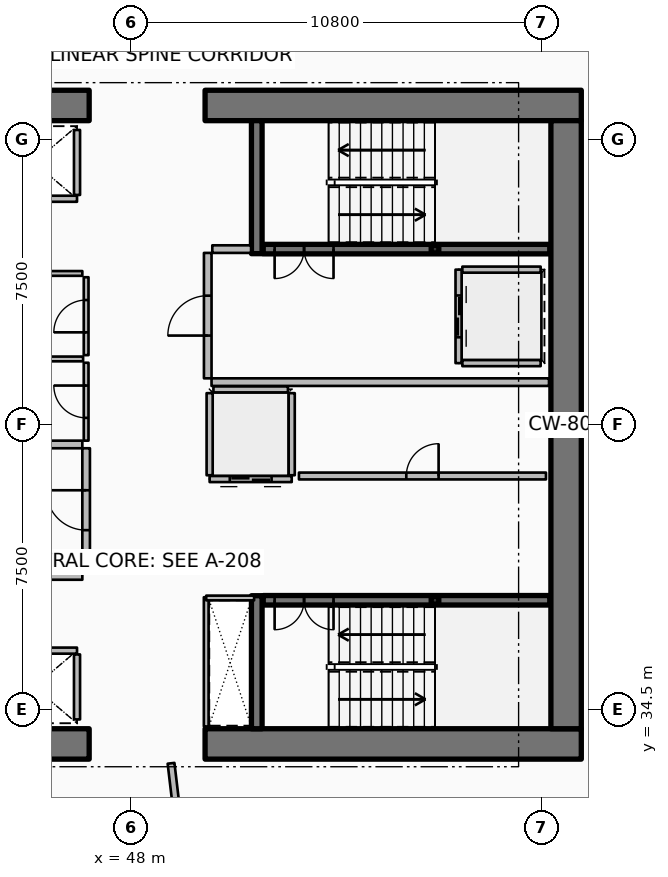
"""IFC4 building model, lengths in metres.
Left out: names, types, materials, properties, quantities, classifications, styles, units other than length and angle.
Written with IfcOpenShell. Run it as: python <this file> out.ifc"""

import sys

from ifc_helpers import new_model, si_unit, direction, frame, frame_2d, origin, origin_2d, place, context, subcontext, project, spatial, rectangle, hollow_rectangle, extrude, element, fill, save


model = new_model("IFC4")
c1 = context("Model", 3, precision=1e-05, world=origin(), true_north=direction((0.0, 1.0)))
c2 = subcontext(c1, "Body", "Model", "MODEL_VIEW")
j1 = project(units=[si_unit("LENGTHUNIT", "METRE"), si_unit("PLANEANGLEUNIT", "RADIAN")], contexts=[c1])
p1 = place(None, origin())
s1 = spatial("IfcSite", under=j1, at=p1, CompositionType="ELEMENT")
p2 = place(p1, origin())
s2 = spatial("IfcBuilding", under=s1, at=p2, CompositionType="ELEMENT")
p3 = place(p2, frame((0.0, 0.0, 142.8)))
s3 = spatial("IfcBuildingStorey", under=s2, at=p3, CompositionType="ELEMENT", Elevation=142.8)
p4 = place(p3, frame((37.0, 33.6, 0.0), z_axis=(0.0, 0.0, 1.0), x_axis=(1.0, 0.0, 0.0)))
e1 = element("IfcWall", 1, at=p4, inside=s3, PredefinedType="SHEAR", context=c2, shape_type="SweptSolid", body=[
    extrude(rectangle(XDim=9.9, YDim=0.8, at=frame_2d((4.95, 0.0))), origin(), (0.0, 0.0, 1.0), 3.75),
])
p5 = place(p3, frame((49.95, 33.6, 0.0), z_axis=(0.0, 0.0, 1.0), x_axis=(1.0, 0.0, 0.0)))
e2 = element("IfcWall", 2, at=p5, inside=s3, PredefinedType="SHEAR", context=c2, shape_type="SweptSolid", body=[
    extrude(rectangle(XDim=9.9, YDim=0.8, at=frame_2d((4.95, 0.0))), origin(), (0.0, 0.0, 1.0), 3.75),
])
p6 = place(p3, frame((37.0, 50.4, 0.0), z_axis=(0.0, 0.0, 1.0), x_axis=(1.0, 0.0, 0.0)))
e3 = element("IfcWall", 3, at=p6, inside=s3, PredefinedType="SHEAR", context=c2, shape_type="SweptSolid", body=[
    extrude(rectangle(XDim=9.9, YDim=0.8, at=frame_2d((4.95, 0.0))), origin(), (0.0, 0.0, 1.0), 3.75),
])
p7 = place(p3, frame((49.95, 50.4, 0.0), z_axis=(0.0, 0.0, 1.0), x_axis=(1.0, 0.0, 0.0)))
e4 = element("IfcWall", 4, at=p7, inside=s3, PredefinedType="SHEAR", context=c2, shape_type="SweptSolid", body=[
    extrude(rectangle(XDim=9.9, YDim=0.8, at=frame_2d((4.95, 0.0))), origin(), (0.0, 0.0, 1.0), 3.75),
])
p8 = place(p3, frame((59.45, 34.0, 0.0), z_axis=(0.0, 0.0, 1.0), x_axis=(0.0, 1.0, 0.0)))
e5 = element("IfcWall", 5, at=p8, inside=s3, PredefinedType="SHEAR", context=c2, shape_type="SweptSolid", body=[
    extrude(rectangle(XDim=16.0, YDim=0.8, at=frame_2d((8.0, 0.0))), origin(), (0.0, 0.0, 1.0), 3.75),
])
for number, where, z_axis, x_axis in (
    (6, (51.31, 46.5, 0.0), (0.0, 0.0, 1.0), (0.0, 1.0, 0.0)),
    (7, (51.31, 34.0, 0.0), (0.0, 0.0, 1.0), (0.0, 1.0, 0.0)),
):
    element("IfcWall", number, at=place(p3, frame(where, z_axis=z_axis, x_axis=x_axis)), inside=s3, PredefinedType="SHEAR", context=c2, shape_type="SweptSolid", body=[
        extrude(rectangle(XDim=3.5, YDim=0.28, at=frame_2d((1.75, 0.0))), origin(), (0.0, 0.0, 1.0), 3.75),
    ])
for number, where, z_axis, x_axis in (
    (8, (56.0, 46.62, 0.0), (0.0, 0.0, 1.0), (1.0, 0.0, 0.0)),
    (9, (56.0, 37.38, 0.0), (0.0, 0.0, 1.0), (1.0, 0.0, 0.0)),
):
    element("IfcColumn", number, at=place(p3, frame(where, z_axis=z_axis, x_axis=x_axis)), inside=s3, PredefinedType="COLUMN", context=c2, shape_type="SweptSolid", body=[
        extrude(hollow_rectangle(XDim=0.2, YDim=0.2, WallThickness=0.01, InnerFilletRadius=0.01, OuterFilletRadius=0.02, at=origin_2d()), origin(), (0.0, 0.0, 1.0), 1.67),
    ])
p9 = place(p3, frame((51.48, 46.62, 0.0), z_axis=(0.0, 0.0, 1.0), x_axis=(1.0, 0.0, 0.0)))
e10 = element("IfcWall", 10, at=p9, inside=s3, PredefinedType="SOLIDWALL", context=c2, shape_type="SweptSolid", body=[
    extrude(rectangle(XDim=7.54, YDim=0.25, at=frame_2d((3.77, 0.0))), origin(), (0.0, 0.0, 1.0), 3.5),
])
p10 = place(p9, frame((0.3, 0.0, 0.0)))
e11 = element("IfcOpeningElement", 11, at=p10, cuts=e10, PredefinedType="OPENING", context=c2, shape_type="SweptSolid", body=[
    extrude(rectangle(XDim=1.55, YDim=2.15, at=frame_2d((0.775, 1.075))), frame((0.0, 0.135, 0.0), z_axis=(0.0, -1.0, 0.0), x_axis=(1.0, 0.0, 0.0)), (0.0, 0.0, 1.0), 0.27),
])
p11 = place(p3, frame((51.48, 37.38, 0.0), z_axis=(0.0, 0.0, 1.0), x_axis=(1.0, 0.0, 0.0)))
e12 = element("IfcWall", 12, at=p11, inside=s3, PredefinedType="SOLIDWALL", context=c2, shape_type="SweptSolid", body=[
    extrude(rectangle(XDim=7.54, YDim=0.25, at=frame_2d((3.77, 0.0))), origin(), (0.0, 0.0, 1.0), 3.5),
])
p12 = place(p11, frame((0.3, 0.0, 0.0)))
e13 = element("IfcOpeningElement", 13, at=p12, cuts=e12, PredefinedType="OPENING", context=c2, shape_type="SweptSolid", body=[
    extrude(rectangle(XDim=1.55, YDim=2.15, at=frame_2d((0.775, 1.075))), frame((0.0, 0.135, 0.0), z_axis=(0.0, -1.0, 0.0), x_axis=(1.0, 0.0, 0.0)), (0.0, 0.0, 1.0), 0.27),
])
p13 = place(p3, frame((46.58, 47.945, 0.0), z_axis=(0.0, 0.0, 1.0), x_axis=(-1.0, 0.0, 0.0)))
e14 = element("IfcWall", 14, at=p13, inside=s3, PredefinedType="PARTITIONING", context=c2, shape_type="SweptSolid", body=[
    extrude(rectangle(XDim=2.26, YDim=0.16, at=frame_2d((1.13, 0.0))), origin(), (0.0, 0.0, 1.0), 3.5),
])
p14 = place(p3, frame((46.58, 48.045, 0.0), z_axis=(0.0, 0.0, 1.0), x_axis=(0.0, 1.0, 0.0)))
e15 = element("IfcWall", 15, at=p14, inside=s3, PredefinedType="PARTITIONING", context=c2, shape_type="SweptSolid", body=[
    extrude(rectangle(XDim=1.71, YDim=0.16, at=frame_2d((0.855, 0.0))), origin(), (0.0, 0.0, 1.0), 3.5),
])
p15 = place(p3, frame((44.32, 36.055, 0.0), z_axis=(0.0, 0.0, 1.0), x_axis=(1.0, 0.0, 0.0)))
e16 = element("IfcWall", 16, at=p15, inside=s3, PredefinedType="PARTITIONING", context=c2, shape_type="SweptSolid", body=[
    extrude(rectangle(XDim=2.26, YDim=0.16, at=frame_2d((1.13, 0.0))), origin(), (0.0, 0.0, 1.0), 3.5),
])
p16 = place(p3, frame((46.58, 34.245, 0.0), z_axis=(0.0, 0.0, 1.0), x_axis=(0.0, 1.0, 0.0)))
e17 = element("IfcWall", 17, at=p16, inside=s3, PredefinedType="PARTITIONING", context=c2, shape_type="SweptSolid", body=[
    extrude(rectangle(XDim=1.71, YDim=0.16, at=frame_2d((0.855, 0.0))), origin(), (0.0, 0.0, 1.0), 3.5),
])
p17 = place(p3, frame((56.62, 46.08, 0.0), z_axis=(0.0, 0.0, 1.0), x_axis=(0.0, -1.0, 0.0)))
e18 = element("IfcWall", 18, at=p17, inside=s3, PredefinedType="PARTITIONING", context=c2, shape_type="SweptSolid", body=[
    extrude(rectangle(XDim=2.46, YDim=0.16, at=frame_2d((1.23, 0.0))), origin(), (0.0, 0.0, 1.0), 3.5),
])
p18 = place(p17, frame((0.68, 0.0, 0.0)))
e19 = element("IfcOpeningElement", 19, at=p18, cuts=e18, PredefinedType="OPENING", context=c2, shape_type="SweptSolid", body=[
    extrude(rectangle(XDim=1.1, YDim=2.1, at=frame_2d((0.55, 1.05))), frame((0.0, 0.09, 0.0), z_axis=(0.0, -1.0, 0.0), x_axis=(1.0, 0.0, 0.0)), (0.0, 0.0, 1.0), 0.18),
])
for number, where, z_axis, x_axis in (
    (20, (56.72, 46.08, 0.0), (0.0, 0.0, 1.0), (1.0, 0.0, 0.0)),
    (21, (56.72, 43.62, 0.0), (0.0, 0.0, 1.0), (1.0, 0.0, 0.0)),
):
    element("IfcWall", number, at=place(p3, frame(where, z_axis=z_axis, x_axis=x_axis)), inside=s3, PredefinedType="PARTITIONING", context=c2, shape_type="SweptSolid", body=[
        extrude(rectangle(XDim=2.06, YDim=0.16, at=frame_2d((1.03, 0.0))), origin(), (0.0, 0.0, 1.0), 3.5),
    ])
p19 = place(p3, frame((52.23, 40.57, 0.0), z_axis=(0.0, 0.0, 1.0), x_axis=(-1.0, 0.0, 0.0)))
e22 = element("IfcWall", 22, at=p19, inside=s3, PredefinedType="PARTITIONING", context=c2, shape_type="SweptSolid", body=[
    extrude(rectangle(XDim=2.16, YDim=0.16, at=frame_2d((1.08, 0.0))), origin(), (0.0, 0.0, 1.0), 3.5),
])
p20 = place(p19, frame((0.53, 0.0, 0.0)))
e23 = element("IfcOpeningElement", 23, at=p20, cuts=e22, PredefinedType="OPENING", context=c2, shape_type="SweptSolid", body=[
    extrude(rectangle(XDim=1.1, YDim=2.1, at=frame_2d((0.55, 1.05))), frame((0.0, 0.09, 0.0), z_axis=(0.0, -1.0, 0.0), x_axis=(1.0, 0.0, 0.0)), (0.0, 0.0, 1.0), 0.18),
])
for number, where, z_axis, x_axis in (
    (24, (52.23, 40.67, 0.0), (0.0, 0.0, 1.0), (0.0, 1.0, 0.0)),
    (25, (50.07, 40.67, 0.0), (0.0, 0.0, 1.0), (0.0, 1.0, 0.0)),
):
    element("IfcWall", number, at=place(p3, frame(where, z_axis=z_axis, x_axis=x_axis)), inside=s3, PredefinedType="PARTITIONING", context=c2, shape_type="SweptSolid", body=[
        extrude(rectangle(XDim=2.16, YDim=0.16, at=frame_2d((1.08, 0.0))), origin(), (0.0, 0.0, 1.0), 3.5),
    ])
p21 = place(p3, frame((50.17, 42.93, 0.0), z_axis=(0.0, 0.0, 1.0), x_axis=(1.0, 0.0, 0.0)))
e26 = element("IfcWall", 26, at=p21, inside=s3, PredefinedType="PARTITIONING", context=c2, shape_type="SweptSolid", body=[
    extrude(rectangle(XDim=1.96, YDim=0.16, at=frame_2d((0.98, 0.0))), origin(), (0.0, 0.0, 1.0), 3.5),
])
p22 = place(p3, frame((52.42, 40.65, 0.0), z_axis=(0.0, 0.0, 1.0), x_axis=(1.0, 0.0, 0.0)))
e27 = element("IfcWall", 27, at=p22, inside=s3, PredefinedType="PARTITIONING", context=c2, shape_type="SweptSolid", body=[
    extrude(rectangle(XDim=6.5, YDim=0.18, at=frame_2d((3.25, 0.0))), origin(), (0.0, 0.0, 1.0), 3.5),
])
p23 = place(p22, frame((2.825, 0.0, 0.0)))
e28 = element("IfcOpeningElement", 28, at=p23, cuts=e27, PredefinedType="OPENING", context=c2, shape_type="SweptSolid", body=[
    extrude(rectangle(XDim=0.85, YDim=2.06, at=frame_2d((0.425, 1.03))), frame((0.0, 0.1, 0.0), z_axis=(0.0, -1.0, 0.0), x_axis=(1.0, 0.0, 0.0)), (0.0, 0.0, 1.0), 0.2),
])
p24 = place(p3, frame((41.35, 38.02, 0.0), z_axis=(0.0, 0.0, 1.0), x_axis=(1.0, 0.0, 0.0)))
e29 = element("IfcWall", 29, at=p24, inside=s3, PredefinedType="PARTITIONING", context=c2, shape_type="SweptSolid", body=[
    extrude(rectangle(XDim=5.37, YDim=0.2, at=frame_2d((2.685, 0.0))), origin(), (0.0, 0.0, 1.0), 3.5),
])
p25 = place(p3, frame((43.92, 41.48, 0.0), z_axis=(0.0, 0.0, 1.0), x_axis=(1.0, 0.0, 0.0)))
e30 = element("IfcWall", 30, at=p25, inside=s3, PredefinedType="PARTITIONING", context=c2, shape_type="SweptSolid", body=[
    extrude(rectangle(XDim=2.8, YDim=0.2, at=frame_2d((1.4, 0.0))), origin(), (0.0, 0.0, 1.0), 3.5),
])
p26 = place(p3, frame((46.82, 38.12, 0.0), z_axis=(0.0, 0.0, 1.0), x_axis=(0.0, 1.0, 0.0)))
e31 = element("IfcWall", 31, at=p26, inside=s3, PredefinedType="PARTITIONING", context=c2, shape_type="SweptSolid", body=[
    extrude(rectangle(XDim=3.26, YDim=0.2, at=frame_2d((1.63, 0.0))), origin(), (0.0, 0.0, 1.0), 3.5),
])
p27 = place(p26, frame((1.105, 0.0, 0.0)))
e32 = element("IfcOpeningElement", 32, at=p27, cuts=e31, PredefinedType="OPENING", context=c2, shape_type="SweptSolid", body=[
    extrude(rectangle(XDim=1.05, YDim=2.1, at=frame_2d((0.525, 1.05))), frame((0.0, 0.11, 0.0), z_axis=(0.0, -1.0, 0.0), x_axis=(1.0, 0.0, 0.0)), (0.0, 0.0, 1.0), 0.22),
])
p28 = place(p3, frame((50.12, 43.12, 0.0), z_axis=(0.0, 0.0, 1.0), x_axis=(1.0, 0.0, 0.0)))
e33 = element("IfcWall", 33, at=p28, inside=s3, PredefinedType="PARTITIONING", context=c2, shape_type="SweptSolid", body=[
    extrude(rectangle(XDim=8.88, YDim=0.2, at=frame_2d((4.44, 0.0))), origin(), (0.0, 0.0, 1.0), 3.5),
])
p29 = place(p3, frame((50.14, 46.62, 0.0), z_axis=(0.0, 0.0, 1.0), x_axis=(1.0, 0.0, 0.0)))
e34 = element("IfcWall", 34, at=p29, inside=s3, PredefinedType="PARTITIONING", context=c2, shape_type="SweptSolid", body=[
    extrude(rectangle(XDim=1.02, YDim=0.2, at=frame_2d((0.51, 0.0))), origin(), (0.0, 0.0, 1.0), 3.5),
])
p30 = place(p3, frame((50.02, 43.22, 0.0), z_axis=(0.0, 0.0, 1.0), x_axis=(0.0, 1.0, 0.0)))
e35 = element("IfcWall", 35, at=p30, inside=s3, PredefinedType="PARTITIONING", context=c2, shape_type="SweptSolid", body=[
    extrude(rectangle(XDim=3.3, YDim=0.2, at=frame_2d((1.65, 0.0))), origin(), (0.0, 0.0, 1.0), 3.5),
])
p31 = place(p30, frame((1.125, 0.0, 0.0)))
e36 = element("IfcOpeningElement", 36, at=p31, cuts=e35, PredefinedType="OPENING", context=c2, shape_type="SweptSolid", body=[
    extrude(rectangle(XDim=1.05, YDim=2.1, at=frame_2d((0.525, 1.05))), frame((0.0, 0.11, 0.0), z_axis=(0.0, -1.0, 0.0), x_axis=(1.0, 0.0, 0.0)), (0.0, 0.0, 1.0), 0.22),
])
p32 = place(p3, frame((41.36, 45.98, 0.0), z_axis=(0.0, 0.0, 1.0), x_axis=(1.0, 0.0, 0.0)))
e37 = element("IfcWall", 37, at=p32, inside=s3, PredefinedType="PARTITIONING", context=c2, shape_type="SweptSolid", body=[
    extrude(rectangle(XDim=5.36, YDim=0.125, at=frame_2d((2.68, 0.0))), origin(), (0.0, 0.0, 1.0), 2.94),
])
p33 = place(p3, frame((49.98, 34.06, 0.0), z_axis=(0.0, 0.0, 1.0), x_axis=(0.0, 1.0, 0.0)))
e38 = element("IfcWall", 38, at=p33, inside=s3, PredefinedType="PARTITIONING", context=c2, shape_type="SweptSolid", body=[
    extrude(rectangle(XDim=3.4, YDim=0.125, at=frame_2d((1.7, 0.0))), origin(), (0.0, 0.0, 1.0), 2.94),
])
p34 = place(p3, frame((49.98, 37.44, 0.0), z_axis=(0.0, 0.0, 1.0), x_axis=(1.0, 0.0, 0.0)))
e39 = element("IfcWall", 39, at=p34, inside=s3, PredefinedType="PARTITIONING", context=c2, shape_type="SweptSolid", body=[
    extrude(rectangle(XDim=1.26, YDim=0.125, at=frame_2d((0.63, 0.0))), origin(), (0.0, 0.0, 1.0), 2.94),
])
p35 = place(p3, frame((44.03, 43.73, 0.0), z_axis=(0.0, 0.0, 1.0), x_axis=(1.0, 0.0, 0.0)))
e40 = element("IfcWall", 40, at=p35, inside=s3, PredefinedType="PARTITIONING", context=c2, shape_type="SweptSolid", body=[
    extrude(rectangle(XDim=2.71, YDim=0.125, at=frame_2d((1.355, 0.0))), origin(), (0.0, 0.0, 1.0), 2.94),
])
p36 = place(p3, frame((46.82, 41.58, 0.0), z_axis=(0.0, 0.0, 1.0), x_axis=(0.0, 1.0, 0.0)))
e41 = element("IfcWall", 41, at=p36, inside=s3, PredefinedType="PARTITIONING", context=c2, shape_type="SweptSolid", body=[
    extrude(rectangle(XDim=2.05, YDim=0.125, at=frame_2d((1.025, 0.0))), origin(), (0.0, 0.0, 1.0), 2.94),
])
p37 = place(p36, frame((0.6, 0.0, 0.0)))
e42 = element("IfcOpeningElement", 42, at=p37, cuts=e41, PredefinedType="OPENING", context=c2, shape_type="SweptSolid", body=[
    extrude(rectangle(XDim=0.85, YDim=2.06, at=frame_2d((0.425, 1.03))), frame((0.0, 0.073, 0.0), z_axis=(0.0, -1.0, 0.0), x_axis=(1.0, 0.0, 0.0)), (0.0, 0.0, 1.0), 0.145),
])
p38 = place(p3, frame((46.82, 43.83, 0.0), z_axis=(0.0, 0.0, 1.0), x_axis=(0.0, 1.0, 0.0)))
e43 = element("IfcWall", 43, at=p38, inside=s3, PredefinedType="PARTITIONING", context=c2, shape_type="SweptSolid", body=[
    extrude(rectangle(XDim=2.05, YDim=0.125, at=frame_2d((1.025, 0.0))), origin(), (0.0, 0.0, 1.0), 2.94),
])
p39 = place(p38, frame((0.6, 0.0, 0.0)))
e44 = element("IfcOpeningElement", 44, at=p39, cuts=e43, PredefinedType="OPENING", context=c2, shape_type="SweptSolid", body=[
    extrude(rectangle(XDim=0.85, YDim=2.06, at=frame_2d((0.425, 1.03))), frame((0.0, 0.073, 0.0), z_axis=(0.0, -1.0, 0.0), x_axis=(1.0, 0.0, 0.0)), (0.0, 0.0, 1.0), 0.145),
])
p40 = place(p3, frame((49.054, 33.091, 0.0), z_axis=(0.0, 0.0, 1.0), x_axis=(0.117543744731, -0.993067705685, 0.0)))
e45 = element("IfcWall", 45, at=p40, inside=s3, PredefinedType="PARTITIONING", context=c2, shape_type="SweptSolid", body=[
    extrude(rectangle(XDim=12.763, YDim=0.18, at=frame_2d((6.382, 0.0))), origin(), (0.0, 0.0, 1.0), 2.94),
])
p41 = place(p3, frame((64.017, 51.093, 0.0), z_axis=(0.0, 0.0, 1.0), x_axis=(-0.649447060425, 0.76040680935, 0.0)))
e46 = element("IfcWall", 46, at=p41, inside=s3, PredefinedType="PARTITIONING", context=c2, shape_type="SweptSolid", body=[
    extrude(rectangle(XDim=6.975, YDim=0.125, at=frame_2d((3.487, 0.0))), origin(), (0.0, 0.0, 1.0), 2.94),
])
p42 = place(p41, frame((3.037, 0.0, 0.0)))
e47 = element("IfcOpeningElement", 47, at=p42, cuts=e46, PredefinedType="OPENING", context=c2, shape_type="SweptSolid", body=[
    extrude(rectangle(XDim=0.9, YDim=2.08, at=frame_2d((0.45, 1.04))), frame((0.0, 0.073, 0.0), z_axis=(0.0, -1.0, 0.0), x_axis=(1.0, 0.0, 0.0)), (0.0, 0.0, 1.0), 0.145),
])
p43 = place(p10, origin())
e48 = element("IfcDoor", 48, at=p43, inside=s3, OperationType="DOUBLE_DOOR_SINGLE_SWING", PredefinedType="DOOR", context=c2, shape_type="SweptSolid", body=[
    extrude(rectangle(XDim=1.55, YDim=2.15, at=frame_2d((0.775, 1.075))), frame((0.0, 0.025, 0.0), z_axis=(0.0, -1.0, 0.0), x_axis=(1.0, 0.0, 0.0)), (0.0, 0.0, 1.0), 0.05),
])
fill(e11, e48)
p44 = place(p12, origin())
e49 = element("IfcDoor", 49, at=p44, inside=s3, OperationType="DOUBLE_DOOR_SINGLE_SWING", PredefinedType="DOOR", context=c2, shape_type="SweptSolid", body=[
    extrude(rectangle(XDim=1.55, YDim=2.15, at=frame_2d((0.775, 1.075))), frame((0.0, 0.025, 0.0), z_axis=(0.0, -1.0, 0.0), x_axis=(1.0, 0.0, 0.0)), (0.0, 0.0, 1.0), 0.05),
])
fill(e13, e49)
p45 = place(p18, origin())
e50 = element("IfcDoor", 50, at=p45, inside=s3, OperationType="DOUBLE_DOOR_SLIDING", PredefinedType="DOOR", context=c2, shape_type="SweptSolid", body=[
    extrude(rectangle(XDim=1.1, YDim=2.1, at=frame_2d((0.55, 1.05))), frame((0.0, 0.025, 0.0), z_axis=(0.0, -1.0, 0.0), x_axis=(1.0, 0.0, 0.0)), (0.0, 0.0, 1.0), 0.05),
])
fill(e19, e50)
p46 = place(p20, origin())
e51 = element("IfcDoor", 51, at=p46, inside=s3, OperationType="DOUBLE_DOOR_SLIDING", PredefinedType="DOOR", context=c2, shape_type="SweptSolid", body=[
    extrude(rectangle(XDim=1.1, YDim=2.1, at=frame_2d((0.55, 1.05))), frame((0.0, 0.025, 0.0), z_axis=(0.0, -1.0, 0.0), x_axis=(1.0, 0.0, 0.0)), (0.0, 0.0, 1.0), 0.05),
])
fill(e23, e51)
p47 = place(p23, origin())
e52 = element("IfcDoor", 52, at=p47, inside=s3, OperationType="SINGLE_SWING_RIGHT", PredefinedType="DOOR", context=c2, shape_type="SweptSolid", body=[
    extrude(rectangle(XDim=0.85, YDim=2.06, at=frame_2d((0.425, 1.03))), frame((0.0, 0.025, 0.0), z_axis=(0.0, -1.0, 0.0), x_axis=(1.0, 0.0, 0.0)), (0.0, 0.0, 1.0), 0.05),
])
fill(e28, e52)
p48 = place(p27, origin())
e53 = element("IfcDoor", 53, at=p48, inside=s3, OperationType="SINGLE_SWING_RIGHT", PredefinedType="DOOR", context=c2, shape_type="SweptSolid", body=[
    extrude(rectangle(XDim=1.05, YDim=2.1, at=frame_2d((0.525, 1.05))), frame((0.0, 0.025, 0.0), z_axis=(0.0, -1.0, 0.0), x_axis=(1.0, 0.0, 0.0)), (0.0, 0.0, 1.0), 0.05),
])
fill(e32, e53)
p49 = place(p31, origin())
e54 = element("IfcDoor", 54, at=p49, inside=s3, OperationType="SINGLE_SWING_LEFT", PredefinedType="DOOR", context=c2, shape_type="SweptSolid", body=[
    extrude(rectangle(XDim=1.05, YDim=2.1, at=frame_2d((0.525, 1.05))), frame((0.0, 0.025, 0.0), z_axis=(0.0, -1.0, 0.0), x_axis=(1.0, 0.0, 0.0)), (0.0, 0.0, 1.0), 0.05),
])
fill(e36, e54)
p50 = place(p37, origin())
e55 = element("IfcDoor", 55, at=p50, inside=s3, OperationType="SINGLE_SWING_RIGHT", PredefinedType="DOOR", context=c2, shape_type="SweptSolid", body=[
    extrude(rectangle(XDim=0.85, YDim=2.06, at=frame_2d((0.425, 1.03))), frame((0.0, 0.025, 0.0), z_axis=(0.0, -1.0, 0.0), x_axis=(1.0, 0.0, 0.0)), (0.0, 0.0, 1.0), 0.05),
])
fill(e42, e55)
p51 = place(p39, origin())
e56 = element("IfcDoor", 56, at=p51, inside=s3, OperationType="SINGLE_SWING_LEFT", PredefinedType="DOOR", context=c2, shape_type="SweptSolid", body=[
    extrude(rectangle(XDim=0.85, YDim=2.06, at=frame_2d((0.425, 1.03))), frame((0.0, 0.025, 0.0), z_axis=(0.0, -1.0, 0.0), x_axis=(1.0, 0.0, 0.0)), (0.0, 0.0, 1.0), 0.05),
])
fill(e44, e56)
save(model, sys.argv[1])
